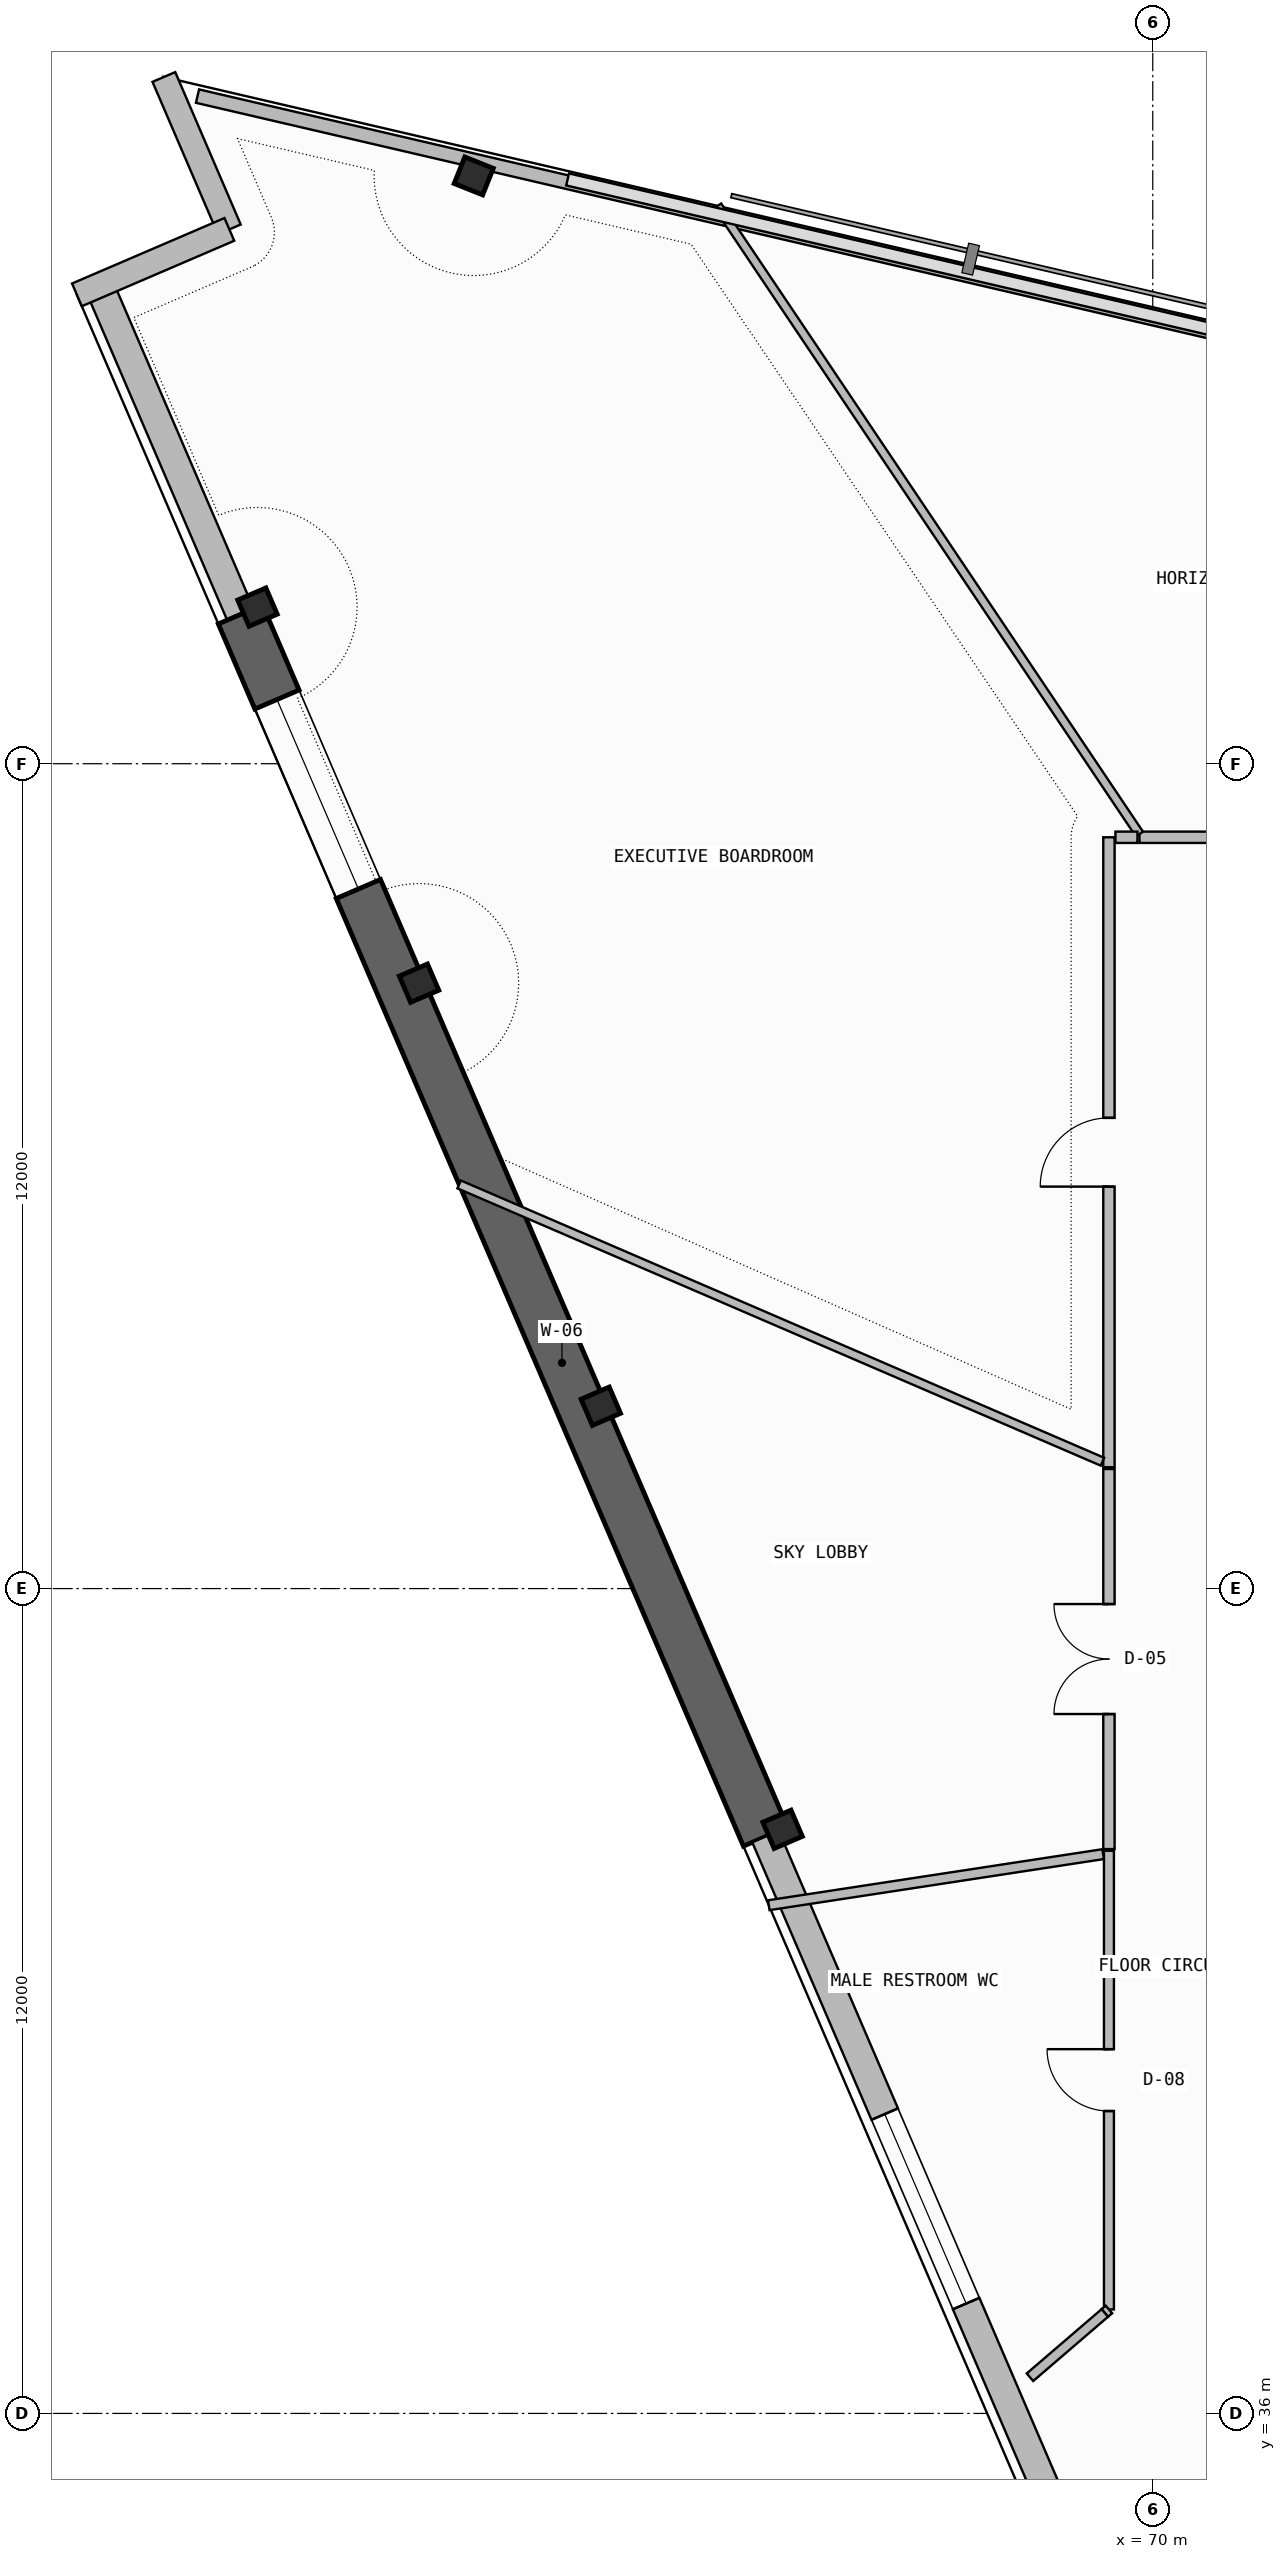
"""IFC4 building model, lengths in metres.
Left out: names, types, materials, properties, quantities, classifications, styles, units other than length and angle.
Written with IfcOpenShell. Run it as: python <this file> out.ifc"""

import sys

from ifc_helpers import new_model, si_unit, direction, frame, frame_2d, origin, origin_2d, place, context, subcontext, project, spatial, rectangle, i_section, extrude, element, fill, save


model = new_model("IFC4")
c1 = context("Model", 3, precision=1e-05, world=origin(), true_north=direction((0.0, 1.0)))
c2 = subcontext(c1, "Body", "Model", "MODEL_VIEW")
j1 = project(units=[si_unit("LENGTHUNIT", "METRE"), si_unit("PLANEANGLEUNIT", "RADIAN")], contexts=[c1])
p1 = place(None, origin())
s1 = spatial("IfcSite", under=j1, at=p1, CompositionType="ELEMENT")
p2 = place(p1, origin())
s2 = spatial("IfcBuilding", under=s1, at=p2, CompositionType="ELEMENT")
p3 = place(p2, frame((0.0, 0.0, 193.18)))
s3 = spatial("IfcBuildingStorey", under=s2, at=p3, CompositionType="ELEMENT", Elevation=193.18)
for number, where, z_axis, x_axis in (
    (1, (60.122, 68.551, 0.0), (0.0, 0.0, 1.0), (0.371, 0.929, 0.0)),
    (2, (56.976, 62.279, 0.0), (0.0, 0.0, 1.0), (-0.395, 0.919, 0.0)),
    (3, (59.326, 56.807, 0.0), (0.0, 0.0, 1.0), (-0.395, 0.919, 0.0)),
    (4, (61.97, 50.653, 0.0), (0.0, 0.0, 1.0), (-0.395, 0.919, 0.0)),
    (5, (64.615, 44.498, 0.0), (0.0, 0.0, 1.0), (-0.395, 0.919, 0.0)),
):
    element("IfcColumn", number, at=place(p3, frame(where, z_axis=z_axis, x_axis=x_axis)), inside=s3, PredefinedType="COLUMN", context=c2, shape_type="SweptSolid", body=[
        extrude(i_section(OverallWidth=0.416, OverallDepth=0.446, WebThickness=0.039, FlangeThickness=0.063, FilletRadius=0.015, at=origin_2d()), origin(), (0.0, 0.0, 1.0), 3.52),
    ])
p4 = place(p3, frame((54.671, 66.959, 0.0), z_axis=(0.0, 0.0, 1.0), x_axis=(0.394733507229, -0.918795656428, 0.0)))
e6 = element("IfcWall", 6, at=p4, inside=s3, PredefinedType="SOLIDWALL", context=c2, shape_type="SweptSolid", body=[
    extrude(rectangle(XDim=5.21, YDim=0.42, at=frame_2d((2.605, 0.0))), origin(), (0.0, 0.0, 1.0), 2.405),
])
p5 = place(p3, frame((56.728, 62.172, -0.26), z_axis=(0.0, 0.0, 1.0), x_axis=(0.394736752992, -0.918794261974, 0.0)))
e7 = element("IfcWall", 7, at=p5, inside=s3, PredefinedType="SHEAR", context=c2, shape_type="SweptSolid", body=[
    extrude(rectangle(XDim=19.353, YDim=0.7, at=frame_2d((9.676, 0.0))), origin(), (0.0, 0.0, 1.0), 3.28),
])
p6 = place(p5, frame((1.347, 0.0, 1.2)))
e8 = element("IfcOpeningElement", 8, at=p6, cuts=e7, PredefinedType="OPENING", context=c2, shape_type="SweptSolid", body=[
    extrude(rectangle(XDim=3.0, YDim=0.9, at=frame_2d((1.5, 0.45))), frame((0.0, 0.36, 0.0), z_axis=(0.0, -1.0, 0.0), x_axis=(1.0, 0.0, 0.0)), (0.0, 0.0, 1.0), 0.72),
])
p7 = place(p3, frame((64.367, 44.391, 0.0), z_axis=(0.0, 0.0, 1.0), x_axis=(0.394757430431, -0.918785378159, 0.0)))
e9 = element("IfcWall", 9, at=p7, inside=s3, PredefinedType="SOLIDWALL", context=c2, shape_type="SweptSolid", body=[
    extrude(rectangle(XDim=12.654, YDim=0.42, at=frame_2d((6.327, 0.0))), origin(), (0.0, 0.0, 1.0), 2.405),
])
p8 = place(p7, frame((4.393, 0.0, 1.2)))
e10 = element("IfcOpeningElement", 10, at=p8, cuts=e9, PredefinedType="OPENING", context=c2, shape_type="SweptSolid", body=[
    extrude(rectangle(XDim=3.0, YDim=0.9, at=frame_2d((1.5, 0.45))), frame((0.0, 0.22, 0.0), z_axis=(0.0, -1.0, 0.0), x_axis=(1.0, 0.0, 0.0)), (0.0, 0.0, 1.0), 0.44),
])
p9 = place(p3, frame((55.614, 69.991, 0.0), z_axis=(0.0, 0.0, 1.0), x_axis=(0.394663989422, -0.918825519592, 0.0)))
e11 = element("IfcWall", 11, at=p9, inside=s3, PredefinedType="SOLIDWALL", context=c2, shape_type="SweptSolid", body=[
    extrude(rectangle(XDim=2.413, YDim=0.36, at=frame_2d((1.207, 0.0))), origin(), (0.0, 0.0, 1.0), 3.02),
])
p10 = place(p3, frame((56.566, 67.773, 0.0), z_axis=(0.0, 0.0, 1.0), x_axis=(-0.918788830096, -0.394749396062, 0.0)))
e12 = element("IfcWall", 12, at=p10, inside=s3, PredefinedType="SOLIDWALL", context=c2, shape_type="SweptSolid", body=[
    extrude(rectangle(XDim=2.413, YDim=0.36, at=frame_2d((1.207, 0.0))), origin(), (0.0, 0.0, 1.0), 3.02),
])
p11 = place(p3, frame((87.165, 62.482, 0.0), z_axis=(0.0, 0.0, 1.0), x_axis=(-0.973958867717, 0.226724775876, 0.0)))
e13 = element("IfcWall", 13, at=p11, inside=s3, PredefinedType="PARAPET", context=c2, shape_type="SweptSolid", body=[
    extrude(rectangle(XDim=31.892, YDim=0.2, at=frame_2d((15.946, 0.0))), origin(), (0.0, 0.0, 1.0), 1.15),
])
p12 = place(p3, frame((69.363, 44.186, 0.0), z_axis=(0.0, 0.0, 1.0), x_axis=(0.0, -1.0, 0.0)))
e14 = element("IfcWall", 14, at=p12, inside=s3, PredefinedType="PARTITIONING", context=c2, shape_type="SweptSolid", body=[
    extrude(rectangle(XDim=6.673, YDim=0.145, at=frame_2d((3.336, 0.0))), origin(), (0.0, 0.0, 1.0), 3.02),
])
p13 = place(p12, frame((2.887, 0.0, 0.0)))
e15 = element("IfcOpeningElement", 15, at=p13, cuts=e14, PredefinedType="OPENING", context=c2, shape_type="SweptSolid", body=[
    extrude(rectangle(XDim=0.9, YDim=2.1, at=frame_2d((0.45, 1.05))), frame((0.0, 0.083, 0.0), z_axis=(0.0, -1.0, 0.0), x_axis=(1.0, 0.0, 0.0)), (0.0, 0.0, 1.0), 0.165),
])
p14 = place(p3, frame((69.363, 37.513, 0.0), z_axis=(0.0, 0.0, 1.0), x_axis=(-0.759038758193, -0.651045438938, 0.0)))
e16 = element("IfcWall", 16, at=p14, inside=s3, PredefinedType="PARTITIONING", context=c2, shape_type="SweptSolid", body=[
    extrude(rectangle(XDim=0.079, YDim=0.145, at=frame_2d((0.04, 0.0))), origin(), (0.0, 0.0, 1.0), 3.02),
])
p15 = place(p3, frame((64.414, 43.394, 0.0), z_axis=(0.0, 0.0, 1.0), x_axis=(0.988542020395, 0.150945930431, 0.0)))
e17 = element("IfcWall", 17, at=p15, inside=s3, PredefinedType="PARTITIONING", context=c2, shape_type="SweptSolid", body=[
    extrude(rectangle(XDim=4.92, YDim=0.145, at=frame_2d((2.46, 0.0))), origin(), (0.0, 0.0, 1.0), 3.02),
])
p16 = place(p3, frame((78.357, 58.93, 0.0), z_axis=(0.0, 0.0, 1.0), x_axis=(-1.0, 0.0, 0.0)))
e18 = element("IfcWall", 18, at=p16, inside=s3, PredefinedType="PARTITIONING", context=c2, shape_type="SweptSolid", body=[
    extrude(rectangle(XDim=8.551, YDim=0.165, at=frame_2d((4.275, 0.0))), origin(), (0.0, 0.0, 1.0), 2.505),
])
p17 = place(p16, frame((2.703, 0.0, 0.0)))
e19 = element("IfcOpeningElement", 19, at=p17, cuts=e18, PredefinedType="OPENING", context=c2, shape_type="SweptSolid", body=[
    extrude(rectangle(XDim=1.0, YDim=2.2, at=frame_2d((0.5, 1.1))), frame((0.0, 0.093, 0.0), z_axis=(0.0, -1.0, 0.0), x_axis=(1.0, 0.0, 0.0)), (0.0, 0.0, 1.0), 0.185),
])
p18 = place(p3, frame((69.806, 58.976, 0.0), z_axis=(0.0, 0.0, 1.0), x_axis=(-0.557460829641, 0.830203242234, 0.0)))
e20 = element("IfcWall", 20, at=p18, inside=s3, PredefinedType="PARTITIONING", context=c2, shape_type="SweptSolid", body=[
    extrude(rectangle(XDim=11.008, YDim=0.125, at=frame_2d((5.504, 0.0))), origin(), (0.0, 0.0, 1.0), 2.505),
])
p19 = place(p3, frame((69.363, 58.93, 0.0), z_axis=(0.0, 0.0, 1.0), x_axis=(0.0, -1.0, 0.0)))
e21 = element("IfcWall", 21, at=p19, inside=s3, PredefinedType="PARTITIONING", context=c2, shape_type="SweptSolid", body=[
    extrude(rectangle(XDim=9.164, YDim=0.165, at=frame_2d((4.582, 0.0))), origin(), (0.0, 0.0, 1.0), 2.505),
])
p20 = place(p19, frame((4.082, 0.0, 0.0)))
e22 = element("IfcOpeningElement", 22, at=p20, cuts=e21, PredefinedType="OPENING", context=c2, shape_type="SweptSolid", body=[
    extrude(rectangle(XDim=1.0, YDim=2.2, at=frame_2d((0.5, 1.1))), frame((0.0, 0.093, 0.0), z_axis=(0.0, -1.0, 0.0), x_axis=(1.0, 0.0, 0.0)), (0.0, 0.0, 1.0), 0.185),
])
p21 = place(p3, frame((69.777, 58.93, 0.0), z_axis=(0.0, 0.0, 1.0), x_axis=(-1.0, 0.0, 0.0)))
e23 = element("IfcWall", 23, at=p21, inside=s3, PredefinedType="PARTITIONING", context=c2, shape_type="SweptSolid", body=[
    extrude(rectangle(XDim=0.32, YDim=0.165, at=frame_2d((0.16, 0.0))), origin(), (0.0, 0.0, 1.0), 2.505),
])
p22 = place(p3, frame((69.268, 49.846, 0.0), z_axis=(0.0, 0.0, 1.0), x_axis=(-0.918317780538, 0.395843976773, 0.0)))
e24 = element("IfcWall", 24, at=p22, inside=s3, PredefinedType="PARTITIONING", context=c2, shape_type="SweptSolid", body=[
    extrude(rectangle(XDim=10.191, YDim=0.125, at=frame_2d((5.096, 0.0))), origin(), (0.0, 0.0, 1.0), 2.405),
])
p23 = place(p3, frame((69.363, 49.74, 0.0), z_axis=(0.0, 0.0, 1.0), x_axis=(0.0, -1.0, 0.0)))
e25 = element("IfcWall", 25, at=p23, inside=s3, PredefinedType="PARTITIONING", context=c2, shape_type="SweptSolid", body=[
    extrude(rectangle(XDim=5.529, YDim=0.165, at=frame_2d((2.765, 0.0))), origin(), (0.0, 0.0, 1.0), 2.505),
])
p24 = place(p23, frame((1.965, 0.0, 0.0)))
e26 = element("IfcOpeningElement", 26, at=p24, cuts=e25, PredefinedType="OPENING", context=c2, shape_type="SweptSolid", body=[
    extrude(rectangle(XDim=1.6, YDim=2.3, at=frame_2d((0.8, 1.15))), frame((0.0, 0.093, 0.0), z_axis=(0.0, -1.0, 0.0), x_axis=(1.0, 0.0, 0.0)), (0.0, 0.0, 1.0), 0.185),
])
p25 = place(p3, frame((69.302, 37.461, 0.0), z_axis=(0.0, 0.0, 1.0), x_axis=(-0.758739995869, -0.65139359735, 0.0)))
e27 = element("IfcWall", 27, at=p25, inside=s3, PredefinedType="PARTITIONING", context=c2, shape_type="SweptSolid", body=[
    extrude(rectangle(XDim=1.435, YDim=0.145, at=frame_2d((0.718, 0.0))), origin(), (0.0, 0.0, 1.0), 3.02),
])
p26 = place(p6, origin())
e28 = element("IfcWindow", 28, at=p26, inside=s3, PartitioningType="SINGLE_PANEL", PredefinedType="WINDOW", context=c2, shape_type="SweptSolid", body=[
    extrude(rectangle(XDim=3.0, YDim=0.9, at=frame_2d((1.5, 0.45))), frame((0.0, 0.03, 0.0), z_axis=(0.0, -1.0, 0.0), x_axis=(1.0, 0.0, 0.0)), (0.0, 0.0, 1.0), 0.06),
])
fill(e8, e28)
p27 = place(p8, origin())
e29 = element("IfcWindow", 29, at=p27, inside=s3, PartitioningType="SINGLE_PANEL", PredefinedType="WINDOW", context=c2, shape_type="SweptSolid", body=[
    extrude(rectangle(XDim=3.0, YDim=0.9, at=frame_2d((1.5, 0.45))), frame((0.0, 0.03, 0.0), z_axis=(0.0, -1.0, 0.0), x_axis=(1.0, 0.0, 0.0)), (0.0, 0.0, 1.0), 0.06),
])
fill(e10, e29)
p28 = place(p13, frame((0.9, 0.0, 0.0), z_axis=(0.0, 0.0, 1.0), x_axis=(-1.0, 0.0, 0.0)))
e30 = element("IfcDoor", 30, at=p28, inside=s3, OperationType="SINGLE_SWING_RIGHT", PredefinedType="DOOR", context=c2, shape_type="SweptSolid", body=[
    extrude(rectangle(XDim=0.9, YDim=2.1, at=frame_2d((0.45, 1.05))), frame((0.0, 0.025, 0.0), z_axis=(0.0, -1.0, 0.0), x_axis=(1.0, 0.0, 0.0)), (0.0, 0.0, 1.0), 0.05),
])
fill(e15, e30)
p29 = place(p20, frame((1.0, 0.0, 0.0), z_axis=(0.0, 0.0, 1.0), x_axis=(-1.0, 0.0, 0.0)))
e31 = element("IfcDoor", 31, at=p29, inside=s3, OperationType="SINGLE_SWING_LEFT", PredefinedType="DOOR", context=c2, shape_type="SweptSolid", body=[
    extrude(rectangle(XDim=1.0, YDim=2.2, at=frame_2d((0.5, 1.1))), frame((0.0, 0.025, 0.0), z_axis=(0.0, -1.0, 0.0), x_axis=(1.0, 0.0, 0.0)), (0.0, 0.0, 1.0), 0.05),
])
fill(e22, e31)
p30 = place(p24, frame((1.6, 0.0, 0.0), z_axis=(0.0, 0.0, 1.0), x_axis=(-1.0, 0.0, 0.0)))
e32 = element("IfcDoor", 32, at=p30, inside=s3, OperationType="DOUBLE_DOOR_SINGLE_SWING", PredefinedType="DOOR", context=c2, shape_type="SweptSolid", body=[
    extrude(rectangle(XDim=1.6, YDim=2.3, at=frame_2d((0.8, 1.15))), frame((0.0, 0.025, 0.0), z_axis=(0.0, -1.0, 0.0), x_axis=(1.0, 0.0, 0.0)), (0.0, 0.0, 1.0), 0.05),
])
fill(e26, e32)
save(model, sys.argv[1])
